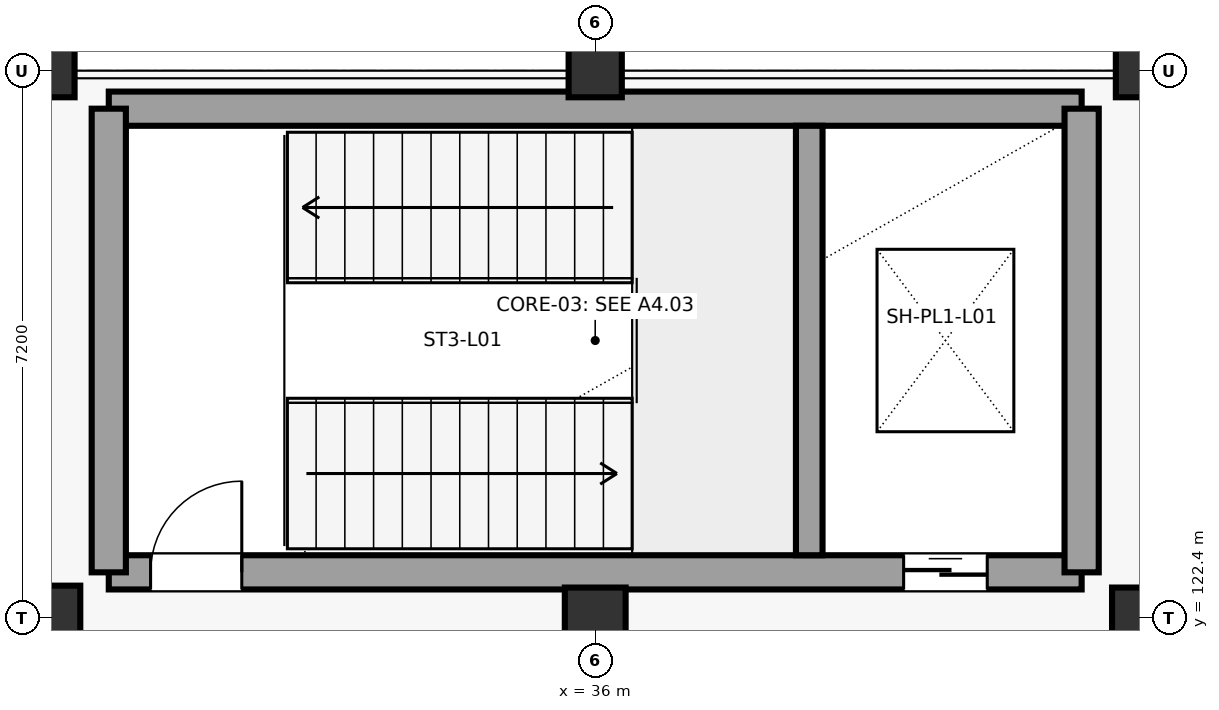
"""IFC4 building model, lengths in metres.
Left out: names, types, materials, properties, quantities, classifications, styles, units other than length and angle.
Written with IfcOpenShell. Run it as: python <this file> out.ifc"""

import sys

from ifc_helpers import new_model, si_unit, direction, frame, frame_2d, origin, origin_2d, place, context, subcontext, project, spatial, rectangle, circle, extrude, element, fill, save


model = new_model("IFC4")
c1 = context("Model", 3, precision=1e-05, world=origin(), true_north=direction((0.0, 1.0)))
c2 = subcontext(c1, "Body", "Model", "MODEL_VIEW")
j1 = project(units=[si_unit("LENGTHUNIT", "METRE"), si_unit("PLANEANGLEUNIT", "RADIAN")], contexts=[c1])
p1 = place(None, origin())
s1 = spatial("IfcSite", under=j1, at=p1, CompositionType="ELEMENT")
p2 = place(p1, origin())
s2 = spatial("IfcBuilding", under=s1, at=p2, CompositionType="ELEMENT")
p3 = place(p2, frame((0.0, 0.0, 5.4)))
s3 = spatial("IfcBuildingStorey", under=s2, at=p3, CompositionType="ELEMENT", Elevation=5.4)
p4 = place(p3, frame((28.8, 122.4, 0.0), z_axis=(0.0, 0.0, 1.0), x_axis=(1.0, 0.0, 0.0)))
e1 = element("IfcColumn", 1, at=p4, inside=s3, PredefinedType="COLUMN", context=c2, shape_type="SweptSolid", body=[
    extrude(rectangle(XDim=0.85, YDim=0.85, at=origin_2d()), origin(), (0.0, 0.0, 1.0), 4.2),
])
p5 = place(p3, frame((28.8, 129.6, 0.0), z_axis=(0.0, 0.0, 1.0), x_axis=(1.0, 0.0, 0.0)))
e2 = element("IfcColumn", 2, at=p5, inside=s3, PredefinedType="COLUMN", context=c2, shape_type="SweptSolid", body=[
    extrude(rectangle(XDim=0.7, YDim=0.7, at=origin_2d()), origin(), (0.0, 0.0, 1.0), 4.2),
])
p6 = place(p3, frame((36.0, 122.4, 0.0), z_axis=(0.0, 0.0, 1.0), x_axis=(1.0, 0.0, 0.0)))
e3 = element("IfcColumn", 3, at=p6, inside=s3, PredefinedType="COLUMN", context=c2, shape_type="SweptSolid", body=[
    extrude(circle(Radius=0.4, at=origin_2d()), origin(), (0.0, 0.0, 1.0), 4.2),
])
p7 = place(p3, frame((36.0, 129.6, 0.0), z_axis=(0.0, 0.0, 1.0), x_axis=(1.0, 0.0, 0.0)))
e4 = element("IfcColumn", 4, at=p7, inside=s3, PredefinedType="COLUMN", context=c2, shape_type="SweptSolid", body=[
    extrude(rectangle(XDim=0.7, YDim=0.7, at=origin_2d()), origin(), (0.0, 0.0, 1.0), 4.2),
])
p8 = place(p3, frame((43.2, 122.4, 0.0), z_axis=(0.0, 0.0, 1.0), x_axis=(1.0, 0.0, 0.0)))
e5 = element("IfcColumn", 5, at=p8, inside=s3, PredefinedType="COLUMN", context=c2, shape_type="SweptSolid", body=[
    extrude(rectangle(XDim=0.8, YDim=0.8, at=origin_2d()), origin(), (0.0, 0.0, 1.0), 4.2),
])
p9 = place(p3, frame((43.2, 129.6, 0.0), z_axis=(0.0, 0.0, 1.0), x_axis=(1.0, 0.0, 0.0)))
e6 = element("IfcColumn", 6, at=p9, inside=s3, PredefinedType="COLUMN", context=c2, shape_type="SweptSolid", body=[
    extrude(rectangle(XDim=0.7, YDim=0.7, at=origin_2d()), origin(), (0.0, 0.0, 1.0), 4.2),
])
p10 = place(p3, frame((29.6, 123.0, 0.0), z_axis=(0.0, 0.0, 1.0), x_axis=(1.0, 0.0, 0.0)))
e7 = element("IfcWall", 7, at=p10, inside=s3, PredefinedType="SHEAR", context=c2, shape_type="SweptSolid", body=[
    extrude(rectangle(XDim=12.8, YDim=0.45, at=frame_2d((6.4, 0.0))), origin(), (0.0, 0.0, 1.0), 3.92),
])
p11 = place(p10, frame((0.55, 0.0, 0.0)))
e8 = element("IfcOpeningElement", 8, at=p11, cuts=e7, PredefinedType="OPENING", context=c2, shape_type="SweptSolid", body=[
    extrude(rectangle(XDim=1.2, YDim=2.25, at=frame_2d((0.6, 1.125))), frame((0.0, 0.235, 0.0), z_axis=(0.0, -1.0, 0.0), x_axis=(1.0, 0.0, 0.0)), (0.0, 0.0, 1.0), 0.47),
])
p12 = place(p10, frame((10.458, 0.0, 0.0)))
e9 = element("IfcOpeningElement", 9, at=p12, cuts=e7, PredefinedType="OPENING", context=c2, shape_type="SweptSolid", body=[
    extrude(rectangle(XDim=1.1, YDim=2.2, at=frame_2d((0.55, 1.1))), frame((0.0, 0.235, 0.0), z_axis=(0.0, -1.0, 0.0), x_axis=(1.0, 0.0, 0.0)), (0.0, 0.0, 1.0), 0.47),
])
p13 = place(p3, frame((29.6, 129.1, 0.0), z_axis=(0.0, 0.0, 1.0), x_axis=(1.0, 0.0, 0.0)))
e10 = element("IfcWall", 10, at=p13, inside=s3, PredefinedType="SHEAR", context=c2, shape_type="SweptSolid", body=[
    extrude(rectangle(XDim=12.8, YDim=0.45, at=frame_2d((6.4, 0.0))), origin(), (0.0, 0.0, 1.0), 3.92),
])
for number, where, z_axis, x_axis in (
    (11, (29.6, 123.0, 0.0), (0.0, 0.0, 1.0), (0.0, 1.0, 0.0)),
    (12, (42.4, 123.0, 0.0), (0.0, 0.0, 1.0), (0.0, 1.0, 0.0)),
):
    element("IfcWall", number, at=place(p3, frame(where, z_axis=z_axis, x_axis=x_axis)), inside=s3, PredefinedType="SHEAR", context=c2, shape_type="SweptSolid", body=[
        extrude(rectangle(XDim=6.1, YDim=0.45, at=frame_2d((3.05, 0.0))), origin(), (0.0, 0.0, 1.0), 3.92),
    ])
p14 = place(p3, frame((38.816, 123.225, 0.0), z_axis=(0.0, 0.0, 1.0), x_axis=(0.0, 1.0, 0.0)))
e13 = element("IfcWall", 13, at=p14, inside=s3, PredefinedType="SHEAR", context=c2, shape_type="SweptSolid", body=[
    extrude(rectangle(XDim=5.65, YDim=0.35, at=frame_2d((2.825, 0.0))), origin(), (0.0, 0.0, 1.0), 3.92),
])
p15 = place(p11, origin())
e14 = element("IfcDoor", 14, at=p15, inside=s3, OperationType="SINGLE_SWING_RIGHT", PredefinedType="DOOR", context=c2, shape_type="SweptSolid", body=[
    extrude(rectangle(XDim=1.2, YDim=2.25, at=frame_2d((0.6, 1.125))), frame((0.0, 0.025, 0.0), z_axis=(0.0, -1.0, 0.0), x_axis=(1.0, 0.0, 0.0)), (0.0, 0.0, 1.0), 0.05),
])
fill(e8, e14)
p16 = place(p12, origin())
e15 = element("IfcDoor", 15, at=p16, inside=s3, OperationType="SLIDING_TO_LEFT", PredefinedType="DOOR", context=c2, shape_type="SweptSolid", body=[
    extrude(rectangle(XDim=1.1, YDim=2.2, at=frame_2d((0.55, 1.1))), frame((0.0, 0.025, 0.0), z_axis=(0.0, -1.0, 0.0), x_axis=(1.0, 0.0, 0.0)), (0.0, 0.0, 1.0), 0.05),
])
fill(e9, e15)
save(model, sys.argv[1])
